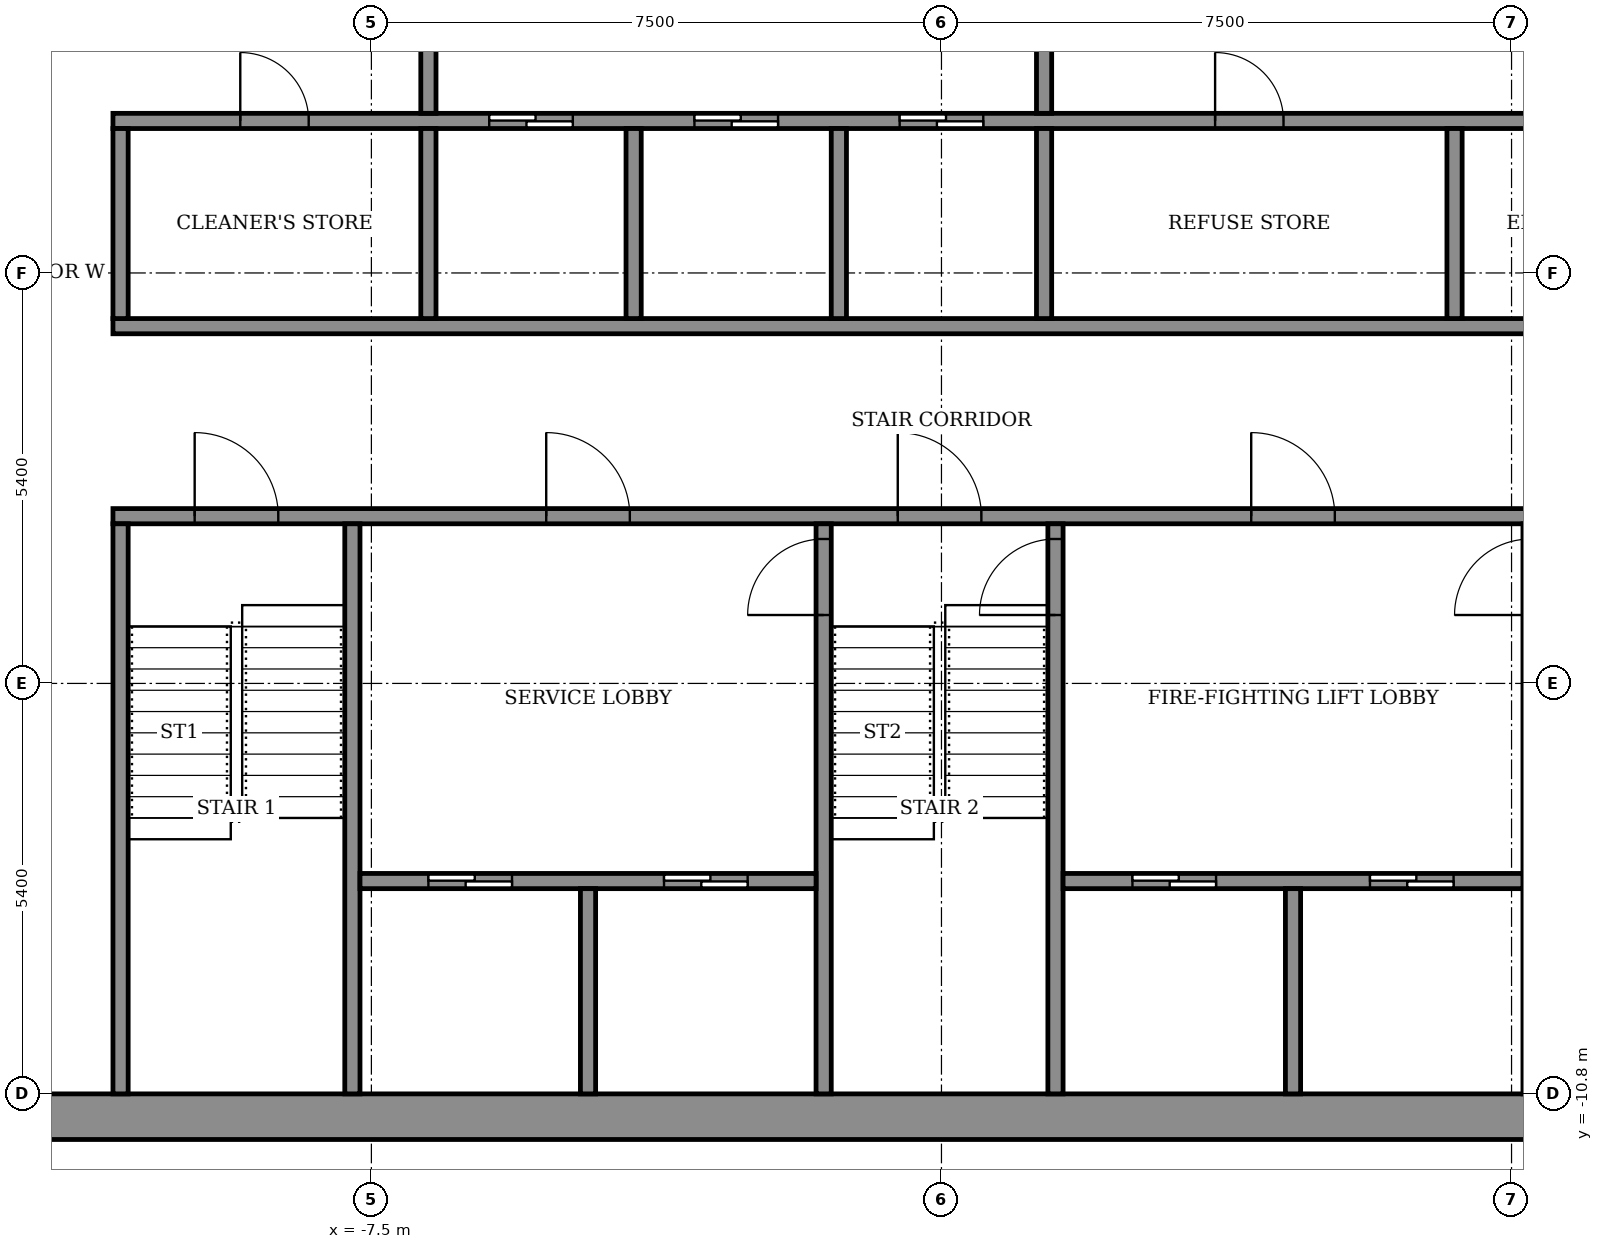
"""IFC4 building model, lengths in metres.
Left out: names, types, materials, properties, quantities, classifications, styles, units other than length and angle.
Written with IfcOpenShell. Run it as: python <this file> out.ifc"""

import sys

from ifc_helpers import new_model, si_unit, direction, frame, frame_2d, origin, place, context, subcontext, project, spatial, rectangle, extrude, element, fill, save


model = new_model("IFC4")
c1 = context("Model", 3, precision=1e-05, world=origin(), true_north=direction((0.0, 1.0)))
c2 = subcontext(c1, "Body", "Model", "MODEL_VIEW")
j1 = project(units=[si_unit("LENGTHUNIT", "METRE"), si_unit("PLANEANGLEUNIT", "RADIAN")], contexts=[c1])
p1 = place(None, origin())
s1 = spatial("IfcSite", under=j1, at=p1, CompositionType="ELEMENT")
p2 = place(p1, origin())
s2 = spatial("IfcBuilding", under=s1, at=p2, CompositionType="ELEMENT")
p3 = place(p2, frame((0.0, 0.0, 350.7)))
s3 = spatial("IfcBuildingStorey", under=s2, at=p3, CompositionType="ELEMENT", Elevation=350.7)
p4 = place(p3, frame((-14.4, -11.1, 0.0), z_axis=(0.0, 0.0, 1.0), x_axis=(1.0, 0.0, 0.0)))
e1 = element("IfcWall", 1, at=p4, inside=s3, PredefinedType="SHEAR", context=c2, shape_type="SweptSolid", body=[
    extrude(rectangle(XDim=28.8, YDim=0.6, at=frame_2d((14.4, 0.0))), origin(), (0.0, 0.0, 1.0), 3.6),
])
p5 = place(p3, frame((-10.9, -3.2, 0.0), z_axis=(0.0, 0.0, 1.0), x_axis=(1.0, 0.0, 0.0)))
e2 = element("IfcWall", 2, at=p5, inside=s3, PredefinedType="SHEAR", context=c2, shape_type="SweptSolid", body=[
    extrude(rectangle(XDim=21.8, YDim=0.2, at=frame_2d((10.9, 0.0))), origin(), (0.0, 0.0, 1.0), 3.05),
])
p6 = place(p5, frame((1.075, 0.0, 0.0)))
e3 = element("IfcOpeningElement", 3, at=p6, cuts=e2, PredefinedType="OPENING", context=c2, shape_type="SweptSolid", body=[
    extrude(rectangle(XDim=1.1, YDim=2.1, at=frame_2d((0.55, 1.05))), frame((0.0, 0.11, 0.0), z_axis=(0.0, -1.0, 0.0), x_axis=(1.0, 0.0, 0.0)), (0.0, 0.0, 1.0), 0.22),
])
p7 = place(p5, frame((10.325, 0.0, 0.0)))
e4 = element("IfcOpeningElement", 4, at=p7, cuts=e2, PredefinedType="OPENING", context=c2, shape_type="SweptSolid", body=[
    extrude(rectangle(XDim=1.1, YDim=2.1, at=frame_2d((0.55, 1.05))), frame((0.0, 0.11, 0.0), z_axis=(0.0, -1.0, 0.0), x_axis=(1.0, 0.0, 0.0)), (0.0, 0.0, 1.0), 0.22),
])
p8 = place(p5, frame((19.625, 0.0, 0.0)))
e5 = element("IfcOpeningElement", 5, at=p8, cuts=e2, PredefinedType="OPENING", context=c2, shape_type="SweptSolid", body=[
    extrude(rectangle(XDim=1.1, YDim=2.1, at=frame_2d((0.55, 1.05))), frame((0.0, 0.11, 0.0), z_axis=(0.0, -1.0, 0.0), x_axis=(1.0, 0.0, 0.0)), (0.0, 0.0, 1.0), 0.22),
])
p9 = place(p5, frame((5.7, 0.0, 0.0)))
e6 = element("IfcOpeningElement", 6, at=p9, cuts=e2, PredefinedType="OPENING", context=c2, shape_type="SweptSolid", body=[
    extrude(rectangle(XDim=1.1, YDim=2.1, at=frame_2d((0.55, 1.05))), frame((0.0, 0.11, 0.0), z_axis=(0.0, -1.0, 0.0), x_axis=(1.0, 0.0, 0.0)), (0.0, 0.0, 1.0), 0.22),
])
p10 = place(p5, frame((14.975, 0.0, 0.0)))
e7 = element("IfcOpeningElement", 7, at=p10, cuts=e2, PredefinedType="OPENING", context=c2, shape_type="SweptSolid", body=[
    extrude(rectangle(XDim=1.1, YDim=2.1, at=frame_2d((0.55, 1.05))), frame((0.0, 0.11, 0.0), z_axis=(0.0, -1.0, 0.0), x_axis=(1.0, 0.0, 0.0)), (0.0, 0.0, 1.0), 0.22),
])
p11 = place(p3, frame((-10.9, -0.7, 0.0), z_axis=(0.0, 0.0, 1.0), x_axis=(1.0, 0.0, 0.0)))
e8 = element("IfcWall", 8, at=p11, inside=s3, PredefinedType="SHEAR", context=c2, shape_type="SweptSolid", body=[
    extrude(rectangle(XDim=21.8, YDim=0.2, at=frame_2d((10.9, 0.0))), origin(), (0.0, 0.0, 1.0), 3.05),
])
p12 = place(p3, frame((-10.9, 2.0, 0.0), z_axis=(0.0, 0.0, 1.0), x_axis=(1.0, 0.0, 0.0)))
e9 = element("IfcWall", 9, at=p12, inside=s3, PredefinedType="SHEAR", context=c2, shape_type="SweptSolid", body=[
    extrude(rectangle(XDim=21.8, YDim=0.2, at=frame_2d((10.9, 0.0))), origin(), (0.0, 0.0, 1.0), 3.05),
])
p13 = place(p12, frame((4.95, 0.0, 0.0)))
e10 = element("IfcOpeningElement", 10, at=p13, cuts=e9, PredefinedType="OPENING", context=c2, shape_type="SweptSolid", body=[
    extrude(rectangle(XDim=1.1, YDim=2.1, at=frame_2d((0.55, 1.05))), frame((0.0, 0.11, 0.0), z_axis=(0.0, -1.0, 0.0), x_axis=(1.0, 0.0, 0.0)), (0.0, 0.0, 1.0), 0.22),
])
p14 = place(p12, frame((7.65, 0.0, 0.0)))
e11 = element("IfcOpeningElement", 11, at=p14, cuts=e9, PredefinedType="OPENING", context=c2, shape_type="SweptSolid", body=[
    extrude(rectangle(XDim=1.1, YDim=2.1, at=frame_2d((0.55, 1.05))), frame((0.0, 0.11, 0.0), z_axis=(0.0, -1.0, 0.0), x_axis=(1.0, 0.0, 0.0)), (0.0, 0.0, 1.0), 0.22),
])
p15 = place(p12, frame((10.35, 0.0, 0.0)))
e12 = element("IfcOpeningElement", 12, at=p15, cuts=e9, PredefinedType="OPENING", context=c2, shape_type="SweptSolid", body=[
    extrude(rectangle(XDim=1.1, YDim=2.1, at=frame_2d((0.55, 1.05))), frame((0.0, 0.11, 0.0), z_axis=(0.0, -1.0, 0.0), x_axis=(1.0, 0.0, 0.0)), (0.0, 0.0, 1.0), 0.22),
])
p16 = place(p12, frame((1.675, 0.0, 0.0)))
e13 = element("IfcOpeningElement", 13, at=p16, cuts=e9, PredefinedType="OPENING", context=c2, shape_type="SweptSolid", body=[
    extrude(rectangle(XDim=0.9, YDim=2.1, at=frame_2d((0.45, 1.05))), frame((0.0, 0.11, 0.0), z_axis=(0.0, -1.0, 0.0), x_axis=(1.0, 0.0, 0.0)), (0.0, 0.0, 1.0), 0.22),
])
p17 = place(p12, frame((14.5, 0.0, 0.0)))
e14 = element("IfcOpeningElement", 14, at=p17, cuts=e9, PredefinedType="OPENING", context=c2, shape_type="SweptSolid", body=[
    extrude(rectangle(XDim=0.9, YDim=2.1, at=frame_2d((0.45, 1.05))), frame((0.0, 0.11, 0.0), z_axis=(0.0, -1.0, 0.0), x_axis=(1.0, 0.0, 0.0)), (0.0, 0.0, 1.0), 0.22),
])
p18 = place(p12, frame((19.225, 0.0, 0.0)))
e15 = element("IfcOpeningElement", 15, at=p18, cuts=e9, PredefinedType="OPENING", context=c2, shape_type="SweptSolid", body=[
    extrude(rectangle(XDim=0.9, YDim=2.1, at=frame_2d((0.45, 1.05))), frame((0.0, 0.11, 0.0), z_axis=(0.0, -1.0, 0.0), x_axis=(1.0, 0.0, 0.0)), (0.0, 0.0, 1.0), 0.22),
])
for number, where, z_axis, x_axis in (
    (16, (-10.8, -10.8, 0.0), (0.0, 0.0, 1.0), (0.0, 1.0, 0.0)),
    (17, (-7.75, -10.8, 0.0), (0.0, 0.0, 1.0), (0.0, 1.0, 0.0)),
):
    element("IfcWall", number, at=place(p3, frame(where, z_axis=z_axis, x_axis=x_axis)), inside=s3, PredefinedType="SHEAR", context=c2, shape_type="SweptSolid", body=[
        extrude(rectangle(XDim=7.5, YDim=0.2, at=frame_2d((3.75, 0.0))), origin(), (0.0, 0.0, 1.0), 3.05),
    ])
p19 = place(p3, frame((-1.55, -10.8, 0.0), z_axis=(0.0, 0.0, 1.0), x_axis=(0.0, 1.0, 0.0)))
e18 = element("IfcWall", 18, at=p19, inside=s3, PredefinedType="SHEAR", context=c2, shape_type="SweptSolid", body=[
    extrude(rectangle(XDim=7.5, YDim=0.2, at=frame_2d((3.75, 0.0))), origin(), (0.0, 0.0, 1.0), 3.05),
])
p20 = place(p19, frame((6.3, 0.0, 0.0)))
e19 = element("IfcOpeningElement", 19, at=p20, cuts=e18, PredefinedType="OPENING", context=c2, shape_type="SweptSolid", body=[
    extrude(rectangle(XDim=1.0, YDim=2.1, at=frame_2d((0.5, 1.05))), frame((0.0, 0.11, 0.0), z_axis=(0.0, -1.0, 0.0), x_axis=(1.0, 0.0, 0.0)), (0.0, 0.0, 1.0), 0.22),
])
p21 = place(p3, frame((1.5, -10.8, 0.0), z_axis=(0.0, 0.0, 1.0), x_axis=(0.0, 1.0, 0.0)))
e20 = element("IfcWall", 20, at=p21, inside=s3, PredefinedType="SHEAR", context=c2, shape_type="SweptSolid", body=[
    extrude(rectangle(XDim=7.5, YDim=0.2, at=frame_2d((3.75, 0.0))), origin(), (0.0, 0.0, 1.0), 3.05),
])
p22 = place(p21, frame((6.3, 0.0, 0.0)))
e21 = element("IfcOpeningElement", 21, at=p22, cuts=e20, PredefinedType="OPENING", context=c2, shape_type="SweptSolid", body=[
    extrude(rectangle(XDim=1.0, YDim=2.1, at=frame_2d((0.5, 1.05))), frame((0.0, 0.11, 0.0), z_axis=(0.0, -1.0, 0.0), x_axis=(1.0, 0.0, 0.0)), (0.0, 0.0, 1.0), 0.22),
])
p23 = place(p3, frame((-7.65, -8.0, 0.0), z_axis=(0.0, 0.0, 1.0), x_axis=(1.0, 0.0, 0.0)))
e22 = element("IfcWall", 22, at=p23, inside=s3, PredefinedType="SHEAR", context=c2, shape_type="SweptSolid", body=[
    extrude(rectangle(XDim=6.0, YDim=0.2, at=frame_2d((3.0, 0.0))), origin(), (0.0, 0.0, 1.0), 3.05),
])
p24 = place(p23, frame((0.9, 0.0, 0.0)))
e23 = element("IfcOpeningElement", 23, at=p24, cuts=e22, PredefinedType="OPENING", context=c2, shape_type="SweptSolid", body=[
    extrude(rectangle(XDim=1.1, YDim=2.1, at=frame_2d((0.55, 1.05))), frame((0.0, 0.11, 0.0), z_axis=(0.0, -1.0, 0.0), x_axis=(1.0, 0.0, 0.0)), (0.0, 0.0, 1.0), 0.22),
])
p25 = place(p23, frame((4.0, 0.0, 0.0)))
e24 = element("IfcOpeningElement", 24, at=p25, cuts=e22, PredefinedType="OPENING", context=c2, shape_type="SweptSolid", body=[
    extrude(rectangle(XDim=1.1, YDim=2.1, at=frame_2d((0.55, 1.05))), frame((0.0, 0.11, 0.0), z_axis=(0.0, -1.0, 0.0), x_axis=(1.0, 0.0, 0.0)), (0.0, 0.0, 1.0), 0.22),
])
p26 = place(p3, frame((-4.65, -10.8, 0.0), z_axis=(0.0, 0.0, 1.0), x_axis=(0.0, 1.0, 0.0)))
e25 = element("IfcWall", 25, at=p26, inside=s3, PredefinedType="SHEAR", context=c2, shape_type="SweptSolid", body=[
    extrude(rectangle(XDim=2.7, YDim=0.2, at=frame_2d((1.35, 0.0))), origin(), (0.0, 0.0, 1.0), 3.05),
])
p27 = place(p3, frame((1.6, -8.0, 0.0), z_axis=(0.0, 0.0, 1.0), x_axis=(1.0, 0.0, 0.0)))
e26 = element("IfcWall", 26, at=p27, inside=s3, PredefinedType="SHEAR", context=c2, shape_type="SweptSolid", body=[
    extrude(rectangle(XDim=6.05, YDim=0.2, at=frame_2d((3.025, 0.0))), origin(), (0.0, 0.0, 1.0), 3.05),
])
p28 = place(p27, frame((0.913, 0.0, 0.0)))
e27 = element("IfcOpeningElement", 27, at=p28, cuts=e26, PredefinedType="OPENING", context=c2, shape_type="SweptSolid", body=[
    extrude(rectangle(XDim=1.1, YDim=2.1, at=frame_2d((0.55, 1.05))), frame((0.0, 0.11, 0.0), z_axis=(0.0, -1.0, 0.0), x_axis=(1.0, 0.0, 0.0)), (0.0, 0.0, 1.0), 0.22),
])
p29 = place(p27, frame((4.038, 0.0, 0.0)))
e28 = element("IfcOpeningElement", 28, at=p29, cuts=e26, PredefinedType="OPENING", context=c2, shape_type="SweptSolid", body=[
    extrude(rectangle(XDim=1.1, YDim=2.1, at=frame_2d((0.55, 1.05))), frame((0.0, 0.11, 0.0), z_axis=(0.0, -1.0, 0.0), x_axis=(1.0, 0.0, 0.0)), (0.0, 0.0, 1.0), 0.22),
])
p30 = place(p3, frame((4.625, -10.8, 0.0), z_axis=(0.0, 0.0, 1.0), x_axis=(0.0, 1.0, 0.0)))
e29 = element("IfcWall", 29, at=p30, inside=s3, PredefinedType="SHEAR", context=c2, shape_type="SweptSolid", body=[
    extrude(rectangle(XDim=2.7, YDim=0.2, at=frame_2d((1.35, 0.0))), origin(), (0.0, 0.0, 1.0), 3.05),
])
p31 = place(p3, frame((-10.8, -0.6, 0.0), z_axis=(0.0, 0.0, 1.0), x_axis=(0.0, 1.0, 0.0)))
e30 = element("IfcWall", 30, at=p31, inside=s3, PredefinedType="STANDARD", context=c2, shape_type="SweptSolid", body=[
    extrude(rectangle(XDim=2.5, YDim=0.2, at=frame_2d((1.25, 0.0))), origin(), (0.0, 0.0, 1.0), 3.05),
])
for number, where, z_axis, x_axis in (
    (31, (-6.75, -0.6, 0.0), (0.0, 0.0, 1.0), (0.0, 1.0, 0.0)),
    (32, (-4.05, -0.6, 0.0), (0.0, 0.0, 1.0), (0.0, 1.0, 0.0)),
    (33, (-1.35, -0.6, 0.0), (0.0, 0.0, 1.0), (0.0, 1.0, 0.0)),
    (34, (1.35, -0.6, 0.0), (0.0, 0.0, 1.0), (0.0, 1.0, 0.0)),
):
    element("IfcWall", number, at=place(p3, frame(where, z_axis=z_axis, x_axis=x_axis)), inside=s3, PredefinedType="SHEAR", context=c2, shape_type="SweptSolid", body=[
        extrude(rectangle(XDim=2.5, YDim=0.2, at=frame_2d((1.25, 0.0))), origin(), (0.0, 0.0, 1.0), 3.05),
    ])
p32 = place(p3, frame((6.75, -0.6, 0.0), z_axis=(0.0, 0.0, 1.0), x_axis=(0.0, 1.0, 0.0)))
e35 = element("IfcWall", 35, at=p32, inside=s3, PredefinedType="STANDARD", context=c2, shape_type="SweptSolid", body=[
    extrude(rectangle(XDim=2.5, YDim=0.2, at=frame_2d((1.25, 0.0))), origin(), (0.0, 0.0, 1.0), 3.05),
])
p33 = place(p3, frame((-6.75, 2.1, 0.0), z_axis=(0.0, 0.0, 1.0), x_axis=(0.0, 1.0, 0.0)))
e36 = element("IfcWall", 36, at=p33, inside=s3, PredefinedType="STANDARD", context=c2, shape_type="SweptSolid", body=[
    extrude(rectangle(XDim=5.9, YDim=0.2, at=frame_2d((2.95, 0.0))), origin(), (0.0, 0.0, 1.0), 3.05),
])
p34 = place(p33, frame((2.35, 0.0, 0.0)))
e37 = element("IfcOpeningElement", 37, at=p34, cuts=e36, PredefinedType="OPENING", context=c2, shape_type="SweptSolid", body=[
    extrude(rectangle(XDim=1.2, YDim=2.1, at=frame_2d((0.6, 1.05))), frame((0.0, 0.11, 0.0), z_axis=(0.0, -1.0, 0.0), x_axis=(1.0, 0.0, 0.0)), (0.0, 0.0, 1.0), 0.22),
])
p35 = place(p3, frame((1.35, 2.1, 0.0), z_axis=(0.0, 0.0, 1.0), x_axis=(0.0, 1.0, 0.0)))
e38 = element("IfcWall", 38, at=p35, inside=s3, PredefinedType="STANDARD", context=c2, shape_type="SweptSolid", body=[
    extrude(rectangle(XDim=5.9, YDim=0.2, at=frame_2d((2.95, 0.0))), origin(), (0.0, 0.0, 1.0), 3.05),
])
p36 = place(p35, frame((2.35, 0.0, 0.0)))
e39 = element("IfcOpeningElement", 39, at=p36, cuts=e38, PredefinedType="OPENING", context=c2, shape_type="SweptSolid", body=[
    extrude(rectangle(XDim=1.2, YDim=2.1, at=frame_2d((0.6, 1.05))), frame((0.0, 0.11, 0.0), z_axis=(0.0, -1.0, 0.0), x_axis=(1.0, 0.0, 0.0)), (0.0, 0.0, 1.0), 0.22),
])
p37 = place(p13, origin())
e40 = element("IfcDoor", 40, at=p37, inside=s3, OperationType="SLIDING_TO_LEFT", PredefinedType="DOOR", context=c2, shape_type="SweptSolid", body=[
    extrude(rectangle(XDim=1.1, YDim=2.1, at=frame_2d((0.55, 1.05))), frame((0.0, 0.025, 0.0), z_axis=(0.0, -1.0, 0.0), x_axis=(1.0, 0.0, 0.0)), (0.0, 0.0, 1.0), 0.05),
])
fill(e10, e40)
p38 = place(p14, origin())
e41 = element("IfcDoor", 41, at=p38, inside=s3, OperationType="SLIDING_TO_LEFT", PredefinedType="DOOR", context=c2, shape_type="SweptSolid", body=[
    extrude(rectangle(XDim=1.1, YDim=2.1, at=frame_2d((0.55, 1.05))), frame((0.0, 0.025, 0.0), z_axis=(0.0, -1.0, 0.0), x_axis=(1.0, 0.0, 0.0)), (0.0, 0.0, 1.0), 0.05),
])
fill(e11, e41)
p39 = place(p15, origin())
e42 = element("IfcDoor", 42, at=p39, inside=s3, OperationType="SLIDING_TO_LEFT", PredefinedType="DOOR", context=c2, shape_type="SweptSolid", body=[
    extrude(rectangle(XDim=1.1, YDim=2.1, at=frame_2d((0.55, 1.05))), frame((0.0, 0.025, 0.0), z_axis=(0.0, -1.0, 0.0), x_axis=(1.0, 0.0, 0.0)), (0.0, 0.0, 1.0), 0.05),
])
fill(e12, e42)
p40 = place(p16, origin())
e43 = element("IfcDoor", 43, at=p40, inside=s3, OperationType="SINGLE_SWING_RIGHT", PredefinedType="DOOR", context=c2, shape_type="SweptSolid", body=[
    extrude(rectangle(XDim=0.9, YDim=2.1, at=frame_2d((0.45, 1.05))), frame((0.0, 0.025, 0.0), z_axis=(0.0, -1.0, 0.0), x_axis=(1.0, 0.0, 0.0)), (0.0, 0.0, 1.0), 0.05),
])
fill(e13, e43)
p41 = place(p17, origin())
e44 = element("IfcDoor", 44, at=p41, inside=s3, OperationType="SINGLE_SWING_RIGHT", PredefinedType="DOOR", context=c2, shape_type="SweptSolid", body=[
    extrude(rectangle(XDim=0.9, YDim=2.1, at=frame_2d((0.45, 1.05))), frame((0.0, 0.025, 0.0), z_axis=(0.0, -1.0, 0.0), x_axis=(1.0, 0.0, 0.0)), (0.0, 0.0, 1.0), 0.05),
])
fill(e14, e44)
p42 = place(p28, origin())
e45 = element("IfcDoor", 45, at=p42, inside=s3, OperationType="SLIDING_TO_LEFT", PredefinedType="DOOR", context=c2, shape_type="SweptSolid", body=[
    extrude(rectangle(XDim=1.1, YDim=2.1, at=frame_2d((0.55, 1.05))), frame((0.0, 0.025, 0.0), z_axis=(0.0, -1.0, 0.0), x_axis=(1.0, 0.0, 0.0)), (0.0, 0.0, 1.0), 0.05),
])
fill(e27, e45)
p43 = place(p24, origin())
e46 = element("IfcDoor", 46, at=p43, inside=s3, OperationType="SLIDING_TO_LEFT", PredefinedType="DOOR", context=c2, shape_type="SweptSolid", body=[
    extrude(rectangle(XDim=1.1, YDim=2.1, at=frame_2d((0.55, 1.05))), frame((0.0, 0.025, 0.0), z_axis=(0.0, -1.0, 0.0), x_axis=(1.0, 0.0, 0.0)), (0.0, 0.0, 1.0), 0.05),
])
fill(e23, e46)
p44 = place(p29, origin())
e47 = element("IfcDoor", 47, at=p44, inside=s3, OperationType="SLIDING_TO_LEFT", PredefinedType="DOOR", context=c2, shape_type="SweptSolid", body=[
    extrude(rectangle(XDim=1.1, YDim=2.1, at=frame_2d((0.55, 1.05))), frame((0.0, 0.025, 0.0), z_axis=(0.0, -1.0, 0.0), x_axis=(1.0, 0.0, 0.0)), (0.0, 0.0, 1.0), 0.05),
])
fill(e28, e47)
p45 = place(p25, origin())
e48 = element("IfcDoor", 48, at=p45, inside=s3, OperationType="SLIDING_TO_LEFT", PredefinedType="DOOR", context=c2, shape_type="SweptSolid", body=[
    extrude(rectangle(XDim=1.1, YDim=2.1, at=frame_2d((0.55, 1.05))), frame((0.0, 0.025, 0.0), z_axis=(0.0, -1.0, 0.0), x_axis=(1.0, 0.0, 0.0)), (0.0, 0.0, 1.0), 0.05),
])
fill(e24, e48)
p46 = place(p6, origin())
e49 = element("IfcDoor", 49, at=p46, inside=s3, OperationType="SINGLE_SWING_RIGHT", PredefinedType="DOOR", context=c2, shape_type="SweptSolid", body=[
    extrude(rectangle(XDim=1.1, YDim=2.1, at=frame_2d((0.55, 1.05))), frame((0.0, 0.025, 0.0), z_axis=(0.0, -1.0, 0.0), x_axis=(1.0, 0.0, 0.0)), (0.0, 0.0, 1.0), 0.05),
])
fill(e3, e49)
p47 = place(p7, origin())
e50 = element("IfcDoor", 50, at=p47, inside=s3, OperationType="SINGLE_SWING_RIGHT", PredefinedType="DOOR", context=c2, shape_type="SweptSolid", body=[
    extrude(rectangle(XDim=1.1, YDim=2.1, at=frame_2d((0.55, 1.05))), frame((0.0, 0.025, 0.0), z_axis=(0.0, -1.0, 0.0), x_axis=(1.0, 0.0, 0.0)), (0.0, 0.0, 1.0), 0.05),
])
fill(e4, e50)
p48 = place(p9, origin())
e51 = element("IfcDoor", 51, at=p48, inside=s3, OperationType="SINGLE_SWING_LEFT", PredefinedType="DOOR", context=c2, shape_type="SweptSolid", body=[
    extrude(rectangle(XDim=1.1, YDim=2.1, at=frame_2d((0.55, 1.05))), frame((0.0, 0.025, 0.0), z_axis=(0.0, -1.0, 0.0), x_axis=(1.0, 0.0, 0.0)), (0.0, 0.0, 1.0), 0.05),
])
fill(e6, e51)
p49 = place(p10, origin())
e52 = element("IfcDoor", 52, at=p49, inside=s3, OperationType="SINGLE_SWING_LEFT", PredefinedType="DOOR", context=c2, shape_type="SweptSolid", body=[
    extrude(rectangle(XDim=1.1, YDim=2.1, at=frame_2d((0.55, 1.05))), frame((0.0, 0.025, 0.0), z_axis=(0.0, -1.0, 0.0), x_axis=(1.0, 0.0, 0.0)), (0.0, 0.0, 1.0), 0.05),
])
fill(e7, e52)
p50 = place(p20, origin())
e53 = element("IfcDoor", 53, at=p50, inside=s3, OperationType="SINGLE_SWING_RIGHT", PredefinedType="DOOR", context=c2, shape_type="SweptSolid", body=[
    extrude(rectangle(XDim=1.0, YDim=2.1, at=frame_2d((0.5, 1.05))), frame((0.0, 0.025, 0.0), z_axis=(0.0, -1.0, 0.0), x_axis=(1.0, 0.0, 0.0)), (0.0, 0.0, 1.0), 0.05),
])
fill(e19, e53)
p51 = place(p22, origin())
e54 = element("IfcDoor", 54, at=p51, inside=s3, OperationType="SINGLE_SWING_RIGHT", PredefinedType="DOOR", context=c2, shape_type="SweptSolid", body=[
    extrude(rectangle(XDim=1.0, YDim=2.1, at=frame_2d((0.5, 1.05))), frame((0.0, 0.025, 0.0), z_axis=(0.0, -1.0, 0.0), x_axis=(1.0, 0.0, 0.0)), (0.0, 0.0, 1.0), 0.05),
])
fill(e21, e54)
save(model, sys.argv[1])
